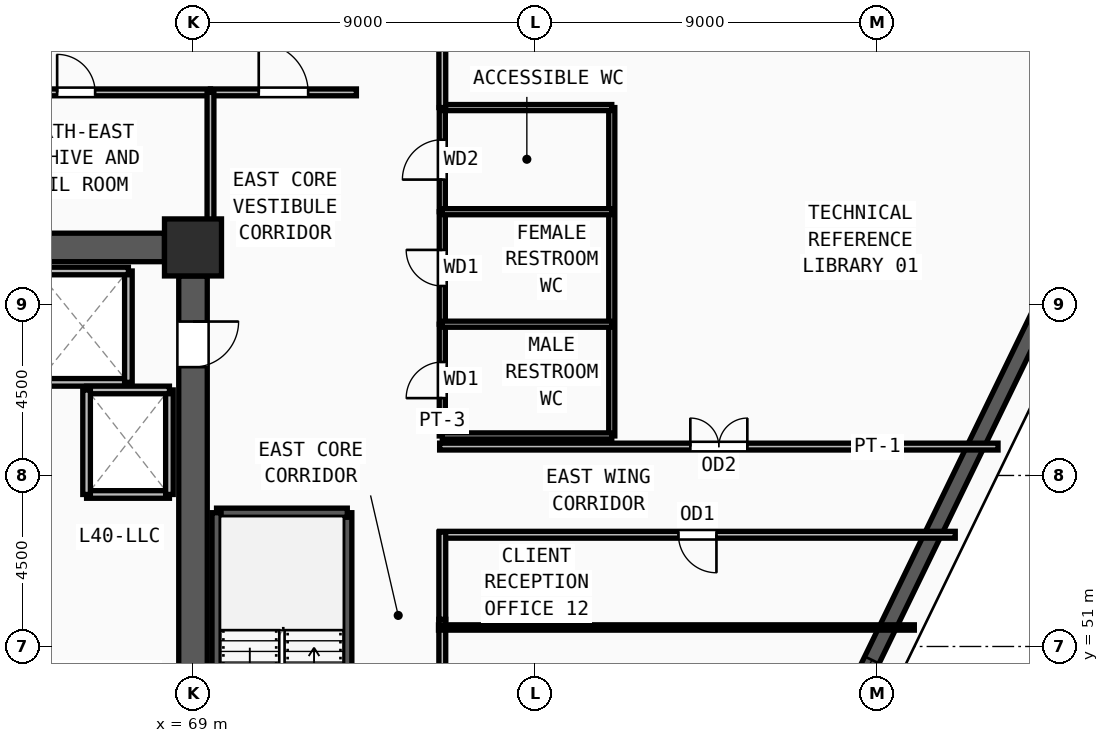
"""IFC4 building model, lengths in metres.
Left out: names, types, materials, properties, quantities, classifications, styles, units other than length and angle.
Written with IfcOpenShell. Run it as: python <this file> out.ifc"""

import sys

from ifc_helpers import new_model, si_unit, direction, frame, frame_2d, origin, origin_2d, place, context, subcontext, project, spatial, rectangle, extrude, source, transform, mapped, element, fill, save


model = new_model("IFC4")
c1 = context("Model", 3, precision=1e-05, world=origin(), true_north=direction((0.0, 1.0)))
c2 = subcontext(c1, "Body", "Model", "MODEL_VIEW")
j1 = project(units=[si_unit("LENGTHUNIT", "METRE"), si_unit("PLANEANGLEUNIT", "RADIAN")], contexts=[c1])
p1 = place(None, origin())
s1 = spatial("IfcSite", under=j1, at=p1, CompositionType="ELEMENT")
p2 = place(p1, origin())
s2 = spatial("IfcBuilding", under=s1, at=p2, CompositionType="ELEMENT")
p3 = place(p2, frame((0.0, 0.0, 155.25)))
s3 = spatial("IfcBuildingStorey", under=s2, at=p3, CompositionType="ELEMENT", Elevation=155.25)
m1 = source(origin(), c2, "Body", "SweptSolid", [
    extrude(rectangle(XDim=1.5, YDim=1.5, at=origin_2d()), origin(), (0.0, 0.0, 1.0), 3.75),
])
p4 = place(p3, frame((69.0, 61.5, 0.0), z_axis=(0.0, 0.0, 1.0), x_axis=(1.0, 0.0, 0.0)))
e1 = element("IfcColumn", 1, at=p4, inside=s3, PredefinedType="COLUMN", context=c2, shape_type="MappedRepresentation", body=[
    mapped(m1, transform((0.0, 0.0, 0.0), x_axis=(1.0, 0.0, 0.0), y_axis=(0.0, 1.0, 0.0), z_axis=(0.0, 0.0, 1.0), scale=1.0)),
])
p5 = place(p3, frame((83.737, 44.203, 0.0), z_axis=(0.0, 0.0, 1.0), x_axis=(0.436800646479, 0.899558333426, 0.0)))
e2 = element("IfcWall", 2, at=p5, inside=s3, PredefinedType="SOLIDWALL", context=c2, shape_type="SweptSolid", body=[
    extrude(rectangle(XDim=25.348, YDim=0.42, at=frame_2d((12.674, 0.0))), origin(), (0.0, 0.0, 1.0), 3.57),
])
m2 = source(origin(), c2, "Body", "SweptSolid", [
    extrude(rectangle(XDim=1.65, YDim=1.95, at=frame_2d((0.825, 0.975))), frame((0.0, 0.22, 0.0), z_axis=(0.0, -1.0, 0.0), x_axis=(1.0, 0.0, 0.0)), (0.0, 0.0, 1.0), 0.44),
])
p6 = place(p5, frame((5.512, 0.0, 0.55)))
e3 = element("IfcOpeningElement", 3, at=p6, cuts=e2, PredefinedType="OPENING", context=c2, shape_type="MappedRepresentation", body=[
    mapped(m2, transform((0.0, 0.0, 0.0), x_axis=(1.0, 0.0, 0.0), y_axis=(0.0, 1.0, 0.0), z_axis=(0.0, 0.0, 1.0), scale=1.0)),
])
p7 = place(p5, frame((18.186, 0.0, 0.55)))
e4 = element("IfcOpeningElement", 4, at=p7, cuts=e2, PredefinedType="OPENING", context=c2, shape_type="MappedRepresentation", body=[
    mapped(m2, transform((0.0, 0.0, 0.0), x_axis=(1.0, 0.0, 0.0), y_axis=(0.0, 1.0, 0.0), z_axis=(0.0, 0.0, 1.0), scale=1.0)),
])
p8 = place(p3, frame((60.75, 61.5, 0.0), z_axis=(0.0, 0.0, 1.0), x_axis=(1.0, 0.0, 0.0)))
e5 = element("IfcWall", 5, at=p8, inside=s3, PredefinedType="SHEAR", context=c2, shape_type="SweptSolid", body=[
    extrude(rectangle(XDim=7.5, YDim=0.75, at=frame_2d((3.75, 0.0))), origin(), (0.0, 0.0, 1.0), 3.57),
])
p9 = place(p3, frame((69.0, 60.75, 0.0), z_axis=(0.0, 0.0, 1.0), x_axis=(0.0, -1.0, 0.0)))
e6 = element("IfcWall", 6, at=p9, inside=s3, PredefinedType="SHEAR", context=c2, shape_type="SweptSolid", body=[
    extrude(rectangle(XDim=13.5, YDim=0.75, at=frame_2d((6.75, 0.0))), origin(), (0.0, 0.0, 1.0), 3.57),
])
m3 = source(origin(), c2, "Body", "SweptSolid", [
    extrude(rectangle(XDim=1.2, YDim=2.2, at=frame_2d((0.6, 1.1))), frame((0.0, 0.385, 0.0), z_axis=(0.0, -1.0, 0.0), x_axis=(1.0, 0.0, 0.0)), (0.0, 0.0, 1.0), 0.77),
])
p10 = place(p9, frame((1.2, 0.0, 0.0)))
e7 = element("IfcOpeningElement", 7, at=p10, cuts=e6, PredefinedType="OPENING", context=c2, shape_type="MappedRepresentation", body=[
    mapped(m3, transform((0.0, 0.0, 0.0), x_axis=(1.0, 0.0, 0.0), y_axis=(0.0, 1.0, 0.0), z_axis=(0.0, 0.0, 1.0), scale=1.0)),
])
p11 = place(p3, frame((73.06, 46.7, 0.0), z_axis=(0.0, 0.0, 1.0), x_axis=(0.0, 1.0, 0.0)))
e8 = element("IfcWall", 8, at=p11, inside=s3, PredefinedType="SOLIDWALL", context=c2, shape_type="SweptSolid", body=[
    extrude(rectangle(XDim=7.82, YDim=0.24, at=frame_2d((3.91, 0.0))), origin(), (0.0, 0.0, 1.0), 3.57),
])
m4 = source(origin(), c2, "Body", "SweptSolid", [
    extrude(rectangle(XDim=1.2, YDim=2.2, at=frame_2d((0.6, 1.1))), frame((0.0, 0.13, 0.0), z_axis=(0.0, -1.0, 0.0), x_axis=(1.0, 0.0, 0.0)), (0.0, 0.0, 1.0), 0.26),
])
p12 = place(p11, frame((0.32, 0.0, 0.0)))
e9 = element("IfcOpeningElement", 9, at=p12, cuts=e8, PredefinedType="OPENING", context=c2, shape_type="MappedRepresentation", body=[
    mapped(m4, transform((0.0, 0.0, 0.0), x_axis=(1.0, 0.0, 0.0), y_axis=(0.0, 1.0, 0.0), z_axis=(0.0, 0.0, 1.0), scale=1.0)),
])
p13 = place(p3, frame((73.06, 54.52, 0.0), z_axis=(0.0, 0.0, 1.0), x_axis=(-1.0, 0.0, 0.0)))
e10 = element("IfcWall", 10, at=p13, inside=s3, PredefinedType="SOLIDWALL", context=c2, shape_type="SweptSolid", body=[
    extrude(rectangle(XDim=3.44, YDim=0.24, at=frame_2d((1.72, 0.0))), origin(), (0.0, 0.0, 1.0), 3.57),
])
p14 = place(p3, frame((69.62, 54.52, 0.0), z_axis=(0.0, 0.0, 1.0), x_axis=(0.0, -1.0, 0.0)))
e11 = element("IfcWall", 11, at=p14, inside=s3, PredefinedType="SOLIDWALL", context=c2, shape_type="SweptSolid", body=[
    extrude(rectangle(XDim=7.82, YDim=0.24, at=frame_2d((3.91, 0.0))), origin(), (0.0, 0.0, 1.0), 3.57),
])
p15 = place(p3, frame((64.9, 57.95, 0.0), z_axis=(0.0, 0.0, 1.0), x_axis=(1.0, 0.0, 0.0)))
e12 = element("IfcWall", 12, at=p15, inside=s3, PredefinedType="SOLIDWALL", context=c2, shape_type="SweptSolid", body=[
    extrude(rectangle(XDim=2.4, YDim=0.2, at=frame_2d((1.2, 0.0))), origin(), (0.0, 0.0, 1.0), 3.57),
])
p16 = place(p3, frame((67.3, 57.95, 0.0), z_axis=(0.0, 0.0, 1.0), x_axis=(0.0, 1.0, 0.0)))
e13 = element("IfcWall", 13, at=p16, inside=s3, PredefinedType="SOLIDWALL", context=c2, shape_type="SweptSolid", body=[
    extrude(rectangle(XDim=2.93, YDim=0.2, at=frame_2d((1.465, 0.0))), origin(), (0.0, 0.0, 1.0), 3.57),
])
p17 = place(p3, frame((67.3, 60.88, 0.0), z_axis=(0.0, 0.0, 1.0), x_axis=(-1.0, 0.0, 0.0)))
e14 = element("IfcWall", 14, at=p17, inside=s3, PredefinedType="SOLIDWALL", context=c2, shape_type="SweptSolid", body=[
    extrude(rectangle(XDim=2.4, YDim=0.2, at=frame_2d((1.2, 0.0))), origin(), (0.0, 0.0, 1.0), 3.57),
])
p18 = place(p3, frame((66.2, 55.0, 0.0), z_axis=(0.0, 0.0, 1.0), x_axis=(1.0, 0.0, 0.0)))
e15 = element("IfcWall", 15, at=p18, inside=s3, PredefinedType="SOLIDWALL", context=c2, shape_type="SweptSolid", body=[
    extrude(rectangle(XDim=2.18, YDim=0.2, at=frame_2d((1.09, 0.0))), origin(), (0.0, 0.0, 1.0), 3.57),
])
p19 = place(p3, frame((68.38, 55.0, 0.0), z_axis=(0.0, 0.0, 1.0), x_axis=(0.0, 1.0, 0.0)))
e16 = element("IfcWall", 16, at=p19, inside=s3, PredefinedType="SOLIDWALL", context=c2, shape_type="SweptSolid", body=[
    extrude(rectangle(XDim=2.75, YDim=0.2, at=frame_2d((1.375, 0.0))), origin(), (0.0, 0.0, 1.0), 3.57),
])
p20 = place(p3, frame((68.38, 57.75, 0.0), z_axis=(0.0, 0.0, 1.0), x_axis=(-1.0, 0.0, 0.0)))
e17 = element("IfcWall", 17, at=p20, inside=s3, PredefinedType="SOLIDWALL", context=c2, shape_type="SweptSolid", body=[
    extrude(rectangle(XDim=2.18, YDim=0.2, at=frame_2d((1.09, 0.0))), origin(), (0.0, 0.0, 1.0), 3.57),
])
p21 = place(p3, frame((66.2, 57.75, 0.0), z_axis=(0.0, 0.0, 1.0), x_axis=(0.0, -1.0, 0.0)))
e18 = element("IfcWall", 18, at=p21, inside=s3, PredefinedType="SOLIDWALL", context=c2, shape_type="SweptSolid", body=[
    extrude(rectangle(XDim=2.75, YDim=0.2, at=frame_2d((1.375, 0.0))), origin(), (0.0, 0.0, 1.0), 3.57),
])
p22 = place(p3, frame((75.56, 56.54, 0.0), z_axis=(0.0, 0.0, 1.0), x_axis=(0.0, 1.0, 0.0)))
e19 = element("IfcWall", 19, at=p22, inside=s3, PredefinedType="PARTITIONING", context=c2, shape_type="SweptSolid", body=[
    extrude(rectangle(XDim=2.94, YDim=0.16, at=frame_2d((1.47, 0.0))), origin(), (0.0, 0.0, 1.0), 3.57),
])
m5 = source(origin(), c2, "Body", "SweptSolid", [
    extrude(rectangle(XDim=0.95, YDim=2.15, at=frame_2d((0.475, 1.075))), frame((0.0, 0.09, 0.0), z_axis=(0.0, -1.0, 0.0), x_axis=(1.0, 0.0, 0.0)), (0.0, 0.0, 1.0), 0.18),
])
p23 = place(p22, frame((0.995, 0.0, 0.0)))
e20 = element("IfcOpeningElement", 20, at=p23, cuts=e19, PredefinedType="OPENING", context=c2, shape_type="MappedRepresentation", body=[
    mapped(m5, transform((0.0, 0.0, 0.0), x_axis=(1.0, 0.0, 0.0), y_axis=(0.0, 1.0, 0.0), z_axis=(0.0, 0.0, 1.0), scale=1.0)),
])
p24 = place(p3, frame((75.56, 59.48, 0.0), z_axis=(0.0, 0.0, 1.0), x_axis=(0.0, 1.0, 0.0)))
e21 = element("IfcWall", 21, at=p24, inside=s3, PredefinedType="PARTITIONING", context=c2, shape_type="SweptSolid", body=[
    extrude(rectangle(XDim=2.96, YDim=0.16, at=frame_2d((1.48, 0.0))), origin(), (0.0, 0.0, 1.0), 3.57),
])
p25 = place(p24, frame((1.005, 0.0, 0.0)))
e22 = element("IfcOpeningElement", 22, at=p25, cuts=e21, PredefinedType="OPENING", context=c2, shape_type="MappedRepresentation", body=[
    mapped(m5, transform((0.0, 0.0, 0.0), x_axis=(1.0, 0.0, 0.0), y_axis=(0.0, 1.0, 0.0), z_axis=(0.0, 0.0, 1.0), scale=1.0)),
])
p26 = place(p3, frame((75.56, 62.44, 0.0), z_axis=(0.0, 0.0, 1.0), x_axis=(0.0, 1.0, 0.0)))
e23 = element("IfcWall", 23, at=p26, inside=s3, PredefinedType="PARTITIONING", context=c2, shape_type="SweptSolid", body=[
    extrude(rectangle(XDim=2.74, YDim=0.16, at=frame_2d((1.37, 0.0))), origin(), (0.0, 0.0, 1.0), 3.57),
])
m6 = source(origin(), c2, "Body", "SweptSolid", [
    extrude(rectangle(XDim=1.05, YDim=2.15, at=frame_2d((0.525, 1.075))), frame((0.0, 0.09, 0.0), z_axis=(0.0, -1.0, 0.0), x_axis=(1.0, 0.0, 0.0)), (0.0, 0.0, 1.0), 0.18),
])
p27 = place(p26, frame((0.845, 0.0, 0.0)))
e24 = element("IfcOpeningElement", 24, at=p27, cuts=e23, PredefinedType="OPENING", context=c2, shape_type="MappedRepresentation", body=[
    mapped(m6, transform((0.0, 0.0, 0.0), x_axis=(1.0, 0.0, 0.0), y_axis=(0.0, 1.0, 0.0), z_axis=(0.0, 0.0, 1.0), scale=1.0)),
])
p28 = place(p3, frame((62.39, 65.58, 0.0), z_axis=(0.0, 0.0, 1.0), x_axis=(1.0, 0.0, 0.0)))
e25 = element("IfcWall", 25, at=p28, inside=s3, PredefinedType="PARTITIONING", context=c2, shape_type="SweptSolid", body=[
    extrude(rectangle(XDim=7.07, YDim=0.18, at=frame_2d((3.535, 0.0))), origin(), (0.0, 0.0, 1.0), 3.57),
])
m7 = source(origin(), c2, "Body", "SweptSolid", [
    extrude(rectangle(XDim=1.0, YDim=2.2, at=frame_2d((0.5, 1.1))), frame((0.0, 0.1, 0.0), z_axis=(0.0, -1.0, 0.0), x_axis=(1.0, 0.0, 0.0)), (0.0, 0.0, 1.0), 0.2),
])
p29 = place(p28, frame((3.035, 0.0, 0.0)))
e26 = element("IfcOpeningElement", 26, at=p29, cuts=e25, PredefinedType="OPENING", context=c2, shape_type="MappedRepresentation", body=[
    mapped(m7, transform((0.0, 0.0, 0.0), x_axis=(1.0, 0.0, 0.0), y_axis=(0.0, 1.0, 0.0), z_axis=(0.0, 0.0, 1.0), scale=1.0)),
])
p30 = place(p3, frame((69.46, 65.58, 0.0), z_axis=(0.0, 0.0, 1.0), x_axis=(1.0, 0.0, 0.0)))
e27 = element("IfcWall", 27, at=p30, inside=s3, PredefinedType="PARTITIONING", context=c2, shape_type="SweptSolid", body=[
    extrude(rectangle(XDim=3.84, YDim=0.18, at=frame_2d((1.92, 0.0))), origin(), (0.0, 0.0, 1.0), 3.57),
])
m8 = source(origin(), c2, "Body", "SweptSolid", [
    extrude(rectangle(XDim=1.3, YDim=2.2, at=frame_2d((0.65, 1.1))), frame((0.0, 0.1, 0.0), z_axis=(0.0, -1.0, 0.0), x_axis=(1.0, 0.0, 0.0)), (0.0, 0.0, 1.0), 0.2),
])
p31 = place(p30, frame((1.27, 0.0, 0.0)))
e28 = element("IfcOpeningElement", 28, at=p31, cuts=e27, PredefinedType="OPENING", context=c2, shape_type="MappedRepresentation", body=[
    mapped(m8, transform((0.0, 0.0, 0.0), x_axis=(1.0, 0.0, 0.0), y_axis=(0.0, 1.0, 0.0), z_axis=(0.0, 0.0, 1.0), scale=1.0)),
])
p32 = place(p3, frame((75.49, 56.26, 0.0), z_axis=(0.0, 0.0, 1.0), x_axis=(1.0, 0.0, 0.0)))
e29 = element("IfcWall", 29, at=p32, inside=s3, PredefinedType="PARTITIONING", context=c2, shape_type="SweptSolid", body=[
    extrude(rectangle(XDim=14.694, YDim=0.18, at=frame_2d((7.347, 0.0))), origin(), (0.0, 0.0, 1.0), 3.57),
])
m9 = source(origin(), c2, "Body", "SweptSolid", [
    extrude(rectangle(XDim=1.5, YDim=2.2, at=frame_2d((0.75, 1.1))), frame((0.0, 0.1, 0.0), z_axis=(0.0, -1.0, 0.0), x_axis=(1.0, 0.0, 0.0)), (0.0, 0.0, 1.0), 0.2),
])
p33 = place(p32, frame((6.597, 0.0, 0.0)))
e30 = element("IfcOpeningElement", 30, at=p33, cuts=e29, PredefinedType="OPENING", context=c2, shape_type="MappedRepresentation", body=[
    mapped(m9, transform((0.0, 0.0, 0.0), x_axis=(1.0, 0.0, 0.0), y_axis=(0.0, 1.0, 0.0), z_axis=(0.0, 0.0, 1.0), scale=1.0)),
])
p34 = place(p3, frame((75.56, 51.715, 0.0), z_axis=(0.0, 0.0, 1.0), x_axis=(0.0, -1.0, 0.0)))
e31 = element("IfcWall", 31, at=p34, inside=s3, PredefinedType="PARTITIONING", context=c2, shape_type="SweptSolid", body=[
    extrude(rectangle(XDim=7.33, YDim=0.18, at=frame_2d((3.665, 0.0))), origin(), (0.0, 0.0, 1.0), 3.155),
])
p35 = place(p34, frame((3.165, 0.0, 0.0)))
e32 = element("IfcOpeningElement", 32, at=p35, cuts=e31, PredefinedType="OPENING", context=c2, shape_type="MappedRepresentation", body=[
    mapped(m7, transform((0.0, 0.0, 0.0), x_axis=(1.0, 0.0, 0.0), y_axis=(0.0, 1.0, 0.0), z_axis=(0.0, 0.0, 1.0), scale=1.0)),
])
p36 = place(p3, frame((89.058, 53.94, 0.0), z_axis=(0.0, 0.0, 1.0), x_axis=(-1.0, 0.0, 0.0)))
e33 = element("IfcWall", 33, at=p36, inside=s3, PredefinedType="PARTITIONING", context=c2, shape_type="SweptSolid", body=[
    extrude(rectangle(XDim=13.568, YDim=0.18, at=frame_2d((6.784, 0.0))), origin(), (0.0, 0.0, 1.0), 3.57),
])
p37 = place(p36, frame((6.284, 0.0, 0.0)))
e34 = element("IfcOpeningElement", 34, at=p37, cuts=e33, PredefinedType="OPENING", context=c2, shape_type="MappedRepresentation", body=[
    mapped(m7, transform((0.0, 0.0, 0.0), x_axis=(1.0, 0.0, 0.0), y_axis=(0.0, 1.0, 0.0), z_axis=(0.0, 0.0, 1.0), scale=1.0)),
])
p38 = place(p3, frame((80.02, 56.54, 0.0), z_axis=(0.0, 0.0, 1.0), x_axis=(0.0, 1.0, 0.0)))
e35 = element("IfcWall", 35, at=p38, inside=s3, PredefinedType="PARTITIONING", context=c2, shape_type="SweptSolid", body=[
    extrude(rectangle(XDim=8.64, YDim=0.16, at=frame_2d((4.32, 0.0))), origin(), (0.0, 0.0, 1.0), 3.57),
])
for number, where, z_axis, x_axis in (
    (36, (75.56, 56.54, 0.0), (0.0, 0.0, 1.0), (1.0, 0.0, 0.0)),
    (37, (75.56, 59.48, 0.0), (0.0, 0.0, 1.0), (1.0, 0.0, 0.0)),
    (38, (75.56, 62.44, 0.0), (0.0, 0.0, 1.0), (1.0, 0.0, 0.0)),
    (39, (75.56, 65.18, 0.0), (0.0, 0.0, 1.0), (1.0, 0.0, 0.0)),
):
    element("IfcWall", number, at=place(p3, frame(where, z_axis=z_axis, x_axis=x_axis)), inside=s3, PredefinedType="PARTITIONING", context=c2, shape_type="SweptSolid", body=[
        extrude(rectangle(XDim=4.46, YDim=0.16, at=frame_2d((2.23, 0.0))), origin(), (0.0, 0.0, 1.0), 3.57),
    ])
p39 = place(p3, frame((69.46, 61.95, 0.0), z_axis=(0.0, 0.0, 1.0), x_axis=(0.0, 1.0, 0.0)))
e40 = element("IfcWall", 40, at=p39, inside=s3, PredefinedType="PARTITIONING", context=c2, shape_type="SweptSolid", body=[
    extrude(rectangle(XDim=3.63, YDim=0.18, at=frame_2d((1.815, 0.0))), origin(), (0.0, 0.0, 1.0), 3.57),
])
p40 = place(p3, frame((75.56, 67.215, 0.0), z_axis=(0.0, 0.0, 1.0), x_axis=(0.0, -1.0, 0.0)))
e41 = element("IfcWall", 41, at=p40, inside=s3, PredefinedType="PARTITIONING", context=c2, shape_type="SweptSolid", body=[
    extrude(rectangle(XDim=2.035, YDim=0.18, at=frame_2d((1.018, 0.0))), origin(), (0.0, 0.0, 1.0), 3.57),
])
p41 = place(p3, frame((75.56, 54.01, 0.0), z_axis=(0.0, 0.0, 1.0), x_axis=(0.0, -1.0, 0.0)))
e42 = element("IfcWall", 42, at=p41, inside=s3, PredefinedType="PARTITIONING", context=c2, shape_type="SweptSolid", body=[
    extrude(rectangle(XDim=2.295, YDim=0.18, at=frame_2d((1.147, 0.0))), origin(), (0.0, 0.0, 1.0), 3.57),
])
p42 = place(p3, frame((75.46, 51.5, 0.0), z_axis=(0.0, 0.0, 1.0), x_axis=(1.0, 0.0, 0.0)))
e43 = element("IfcWall", 43, at=p42, inside=s3, PredefinedType="PARTITIONING", context=c2, shape_type="SweptSolid", body=[
    extrude(rectangle(XDim=12.521, YDim=0.14, at=frame_2d((6.26, 0.0))), origin(), (0.0, 0.0, 1.0), 3.57),
])
m10 = source(origin(), c2, "Body", "SweptSolid", [
    extrude(rectangle(XDim=1.65, YDim=1.95, at=frame_2d((0.825, 0.975))), frame((0.0, 0.03, 0.0), z_axis=(0.0, -1.0, 0.0), x_axis=(1.0, 0.0, 0.0)), (0.0, 0.0, 1.0), 0.06),
])
p43 = place(p6, origin())
e44 = element("IfcWindow", 44, at=p43, inside=s3, PartitioningType="DOUBLE_PANEL_VERTICAL", PredefinedType="WINDOW", context=c2, shape_type="MappedRepresentation", body=[
    mapped(m10, transform((0.0, 0.0, 0.0), x_axis=(1.0, 0.0, 0.0), y_axis=(0.0, 1.0, 0.0), z_axis=(0.0, 0.0, 1.0), scale=1.0)),
])
fill(e3, e44)
m11 = source(origin(), c2, "Body", "SweptSolid", [
    extrude(rectangle(XDim=1.2, YDim=2.2, at=frame_2d((0.6, 1.1))), frame((0.0, 0.025, 0.0), z_axis=(0.0, -1.0, 0.0), x_axis=(1.0, 0.0, 0.0)), (0.0, 0.0, 1.0), 0.05),
])
p44 = place(p10, origin())
e45 = element("IfcDoor", 45, at=p44, inside=s3, OperationType="SINGLE_SWING_LEFT", PredefinedType="DOOR", context=c2, shape_type="MappedRepresentation", body=[
    mapped(m11, transform((0.0, 0.0, 0.0), x_axis=(1.0, 0.0, 0.0), y_axis=(0.0, 1.0, 0.0), z_axis=(0.0, 0.0, 1.0), scale=1.0)),
])
fill(e7, e45)
m12 = source(origin(), c2, "Body", "SweptSolid", [
    extrude(rectangle(XDim=0.95, YDim=2.15, at=frame_2d((0.475, 1.075))), frame((0.0, 0.025, 0.0), z_axis=(0.0, -1.0, 0.0), x_axis=(1.0, 0.0, 0.0)), (0.0, 0.0, 1.0), 0.05),
])
p45 = place(p23, origin())
e46 = element("IfcDoor", 46, at=p45, inside=s3, OperationType="SINGLE_SWING_LEFT", PredefinedType="DOOR", context=c2, shape_type="MappedRepresentation", body=[
    mapped(m12, transform((0.0, 0.0, 0.0), x_axis=(1.0, 0.0, 0.0), y_axis=(0.0, 1.0, 0.0), z_axis=(0.0, 0.0, 1.0), scale=1.0)),
])
fill(e20, e46)
p46 = place(p25, origin())
e47 = element("IfcDoor", 47, at=p46, inside=s3, OperationType="SINGLE_SWING_RIGHT", PredefinedType="DOOR", context=c2, shape_type="MappedRepresentation", body=[
    mapped(m12, transform((0.0, 0.0, 0.0), x_axis=(1.0, 0.0, 0.0), y_axis=(0.0, 1.0, 0.0), z_axis=(0.0, 0.0, 1.0), scale=1.0)),
])
fill(e22, e47)
m13 = source(origin(), c2, "Body", "SweptSolid", [
    extrude(rectangle(XDim=1.05, YDim=2.15, at=frame_2d((0.525, 1.075))), frame((0.0, 0.025, 0.0), z_axis=(0.0, -1.0, 0.0), x_axis=(1.0, 0.0, 0.0)), (0.0, 0.0, 1.0), 0.05),
])
p47 = place(p27, origin())
e48 = element("IfcDoor", 48, at=p47, inside=s3, OperationType="SINGLE_SWING_LEFT", PredefinedType="DOOR", context=c2, shape_type="MappedRepresentation", body=[
    mapped(m13, transform((0.0, 0.0, 0.0), x_axis=(1.0, 0.0, 0.0), y_axis=(0.0, 1.0, 0.0), z_axis=(0.0, 0.0, 1.0), scale=1.0)),
])
fill(e24, e48)
m14 = source(origin(), c2, "Body", "SweptSolid", [
    extrude(rectangle(XDim=1.0, YDim=2.2, at=frame_2d((0.5, 1.1))), frame((0.0, 0.025, 0.0), z_axis=(0.0, -1.0, 0.0), x_axis=(1.0, 0.0, 0.0)), (0.0, 0.0, 1.0), 0.05),
])
p48 = place(p29, origin())
e49 = element("IfcDoor", 49, at=p48, inside=s3, OperationType="SINGLE_SWING_LEFT", PredefinedType="DOOR", context=c2, shape_type="MappedRepresentation", body=[
    mapped(m14, transform((0.0, 0.0, 0.0), x_axis=(1.0, 0.0, 0.0), y_axis=(0.0, 1.0, 0.0), z_axis=(0.0, 0.0, 1.0), scale=1.0)),
])
fill(e26, e49)
m15 = source(origin(), c2, "Body", "SweptSolid", [
    extrude(rectangle(XDim=1.3, YDim=2.2, at=frame_2d((0.65, 1.1))), frame((0.0, 0.025, 0.0), z_axis=(0.0, -1.0, 0.0), x_axis=(1.0, 0.0, 0.0)), (0.0, 0.0, 1.0), 0.05),
])
p49 = place(p31, origin())
e50 = element("IfcDoor", 50, at=p49, inside=s3, OperationType="SINGLE_SWING_LEFT", PredefinedType="DOOR", context=c2, shape_type="MappedRepresentation", body=[
    mapped(m15, transform((0.0, 0.0, 0.0), x_axis=(1.0, 0.0, 0.0), y_axis=(0.0, 1.0, 0.0), z_axis=(0.0, 0.0, 1.0), scale=1.0)),
])
fill(e28, e50)
m16 = source(origin(), c2, "Body", "SweptSolid", [
    extrude(rectangle(XDim=1.5, YDim=2.2, at=frame_2d((0.75, 1.1))), frame((0.0, 0.025, 0.0), z_axis=(0.0, -1.0, 0.0), x_axis=(1.0, 0.0, 0.0)), (0.0, 0.0, 1.0), 0.05),
])
p50 = place(p33, origin())
e51 = element("IfcDoor", 51, at=p50, inside=s3, OperationType="DOUBLE_DOOR_SINGLE_SWING", PredefinedType="DOOR", context=c2, shape_type="MappedRepresentation", body=[
    mapped(m16, transform((0.0, 0.0, 0.0), x_axis=(1.0, 0.0, 0.0), y_axis=(0.0, 1.0, 0.0), z_axis=(0.0, 0.0, 1.0), scale=1.0)),
])
fill(e30, e51)
p51 = place(p37, origin())
e52 = element("IfcDoor", 52, at=p51, inside=s3, OperationType="SINGLE_SWING_LEFT", PredefinedType="DOOR", context=c2, shape_type="MappedRepresentation", body=[
    mapped(m14, transform((0.0, 0.0, 0.0), x_axis=(1.0, 0.0, 0.0), y_axis=(0.0, 1.0, 0.0), z_axis=(0.0, 0.0, 1.0), scale=1.0)),
])
fill(e34, e52)
save(model, sys.argv[1])
